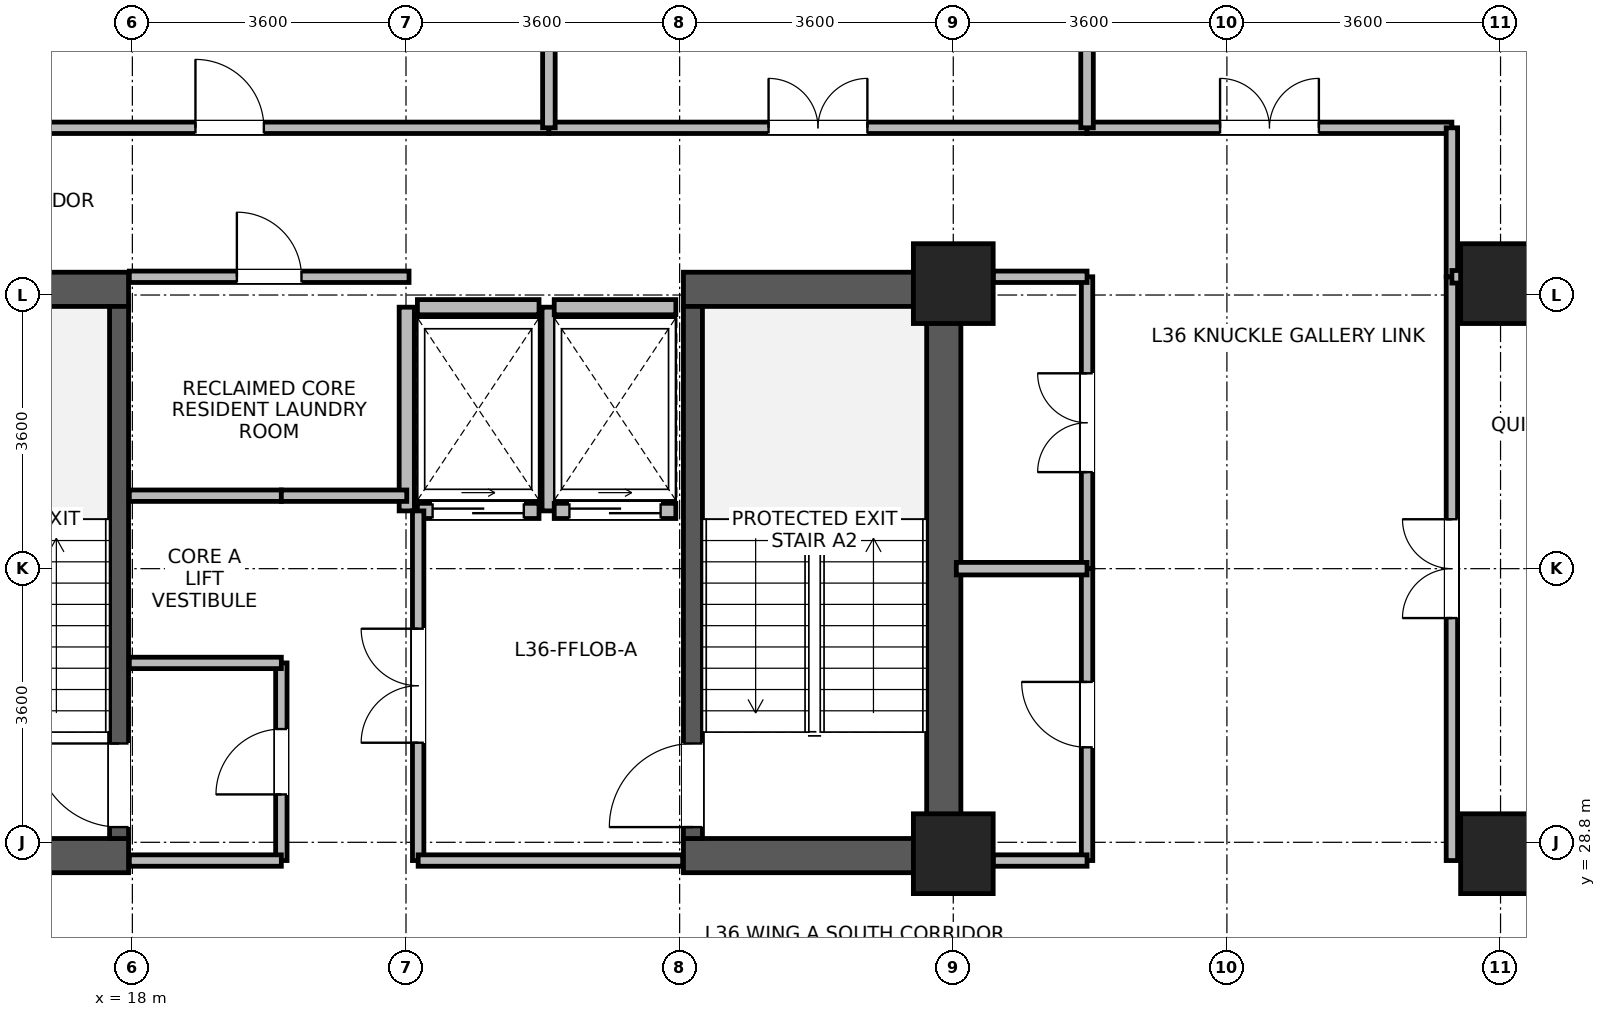
"""IFC4 building model, lengths in metres.
Left out: names, types, materials, properties, quantities, classifications, styles, units other than length and angle.
Written with IfcOpenShell. Run it as: python <this file> out.ifc"""

import sys

from ifc_helpers import new_model, si_unit, direction, frame, frame_2d, origin, origin_2d, place, context, subcontext, project, spatial, rectangle, extrude, source, transform, mapped, element, fill, save


model = new_model("IFC4")
c1 = context("Model", 3, precision=1e-05, world=origin(), true_north=direction((0.0, 1.0)))
c2 = subcontext(c1, "Body", "Model", "MODEL_VIEW")
j1 = project(units=[si_unit("LENGTHUNIT", "METRE"), si_unit("PLANEANGLEUNIT", "RADIAN")], contexts=[c1])
p1 = place(None, origin())
s1 = spatial("IfcSite", under=j1, at=p1, CompositionType="ELEMENT")
p2 = place(p1, origin())
s2 = spatial("IfcBuilding", under=s1, at=p2, CompositionType="ELEMENT")
p3 = place(p2, frame((0.0, 0.0, 143.9)))
s3 = spatial("IfcBuildingStorey", under=s2, at=p3, CompositionType="ELEMENT", Elevation=143.9)
p4 = place(p3, frame((28.675, 28.4, 0.0), z_axis=(0.0, 0.0, 1.0), x_axis=(0.0, 1.0, 0.0)))
e1 = element("IfcWall", 1, at=p4, inside=s3, PredefinedType="SHEAR", context=c2, shape_type="SweptSolid", body=[
    extrude(rectangle(XDim=7.9, YDim=0.45, at=frame_2d((3.95, 0.0))), origin(), (0.0, 0.0, 1.0), 3.46),
])
for number, where, z_axis, x_axis in (
    (2, (14.75, 28.625, 0.0), (0.0, 0.0, 1.0), (1.0, 0.0, 0.0)),
    (3, (25.25, 28.625, 0.0), (0.0, 0.0, 1.0), (1.0, 0.0, 0.0)),
    (4, (14.75, 36.075, 0.0), (0.0, 0.0, 1.0), (1.0, 0.0, 0.0)),
    (5, (25.25, 36.075, 0.0), (0.0, 0.0, 1.0), (1.0, 0.0, 0.0)),
):
    element("IfcWall", number, at=place(p3, frame(where, z_axis=z_axis, x_axis=x_axis)), inside=s3, PredefinedType="SHEAR", context=c2, shape_type="SweptSolid", body=[
        extrude(rectangle(XDim=3.2, YDim=0.45, at=frame_2d((1.6, 0.0))), origin(), (0.0, 0.0, 1.0), 3.46),
    ])
p5 = place(p3, frame((17.825, 28.85, 0.0), z_axis=(0.0, 0.0, 1.0), x_axis=(0.0, 1.0, 0.0)))
e6 = element("IfcWall", 6, at=p5, inside=s3, PredefinedType="SHEAR", context=c2, shape_type="SweptSolid", body=[
    extrude(rectangle(XDim=7.0, YDim=0.25, at=frame_2d((3.5, 0.0))), origin(), (0.0, 0.0, 1.0), 3.46),
])
p6 = place(p5, frame((0.15, 0.0, 0.0)))
e7 = element("IfcOpeningElement", 7, at=p6, cuts=e6, PredefinedType="OPENING", context=c2, shape_type="SweptSolid", body=[
    extrude(rectangle(XDim=1.1, YDim=2.08, at=frame_2d((0.55, 1.04))), frame((0.0, 0.135, 0.0), z_axis=(0.0, -1.0, 0.0), x_axis=(1.0, 0.0, 0.0)), (0.0, 0.0, 1.0), 0.27),
])
p7 = place(p3, frame((25.375, 28.85, 0.0), z_axis=(0.0, 0.0, 1.0), x_axis=(0.0, 1.0, 0.0)))
e8 = element("IfcWall", 8, at=p7, inside=s3, PredefinedType="SHEAR", context=c2, shape_type="SweptSolid", body=[
    extrude(rectangle(XDim=7.0, YDim=0.25, at=frame_2d((3.5, 0.0))), origin(), (0.0, 0.0, 1.0), 3.46),
])
p8 = place(p7, frame((0.15, 0.0, 0.0)))
e9 = element("IfcOpeningElement", 9, at=p8, cuts=e8, PredefinedType="OPENING", context=c2, shape_type="SweptSolid", body=[
    extrude(rectangle(XDim=1.1, YDim=2.08, at=frame_2d((0.55, 1.04))), frame((0.0, 0.135, 0.0), z_axis=(0.0, -1.0, 0.0), x_axis=(1.0, 0.0, 0.0)), (0.0, 0.0, 1.0), 0.27),
])
m1 = source(origin(), c2, "Body", "SweptSolid", [
    extrude(rectangle(XDim=1.05, YDim=1.05, at=origin_2d()), origin(), (0.0, 0.0, 1.0), 3.7),
])
for number, where, z_axis, x_axis in (
    (10, (28.8, 28.65, 0.0), (0.0, 0.0, 1.0), (1.0, 0.0, 0.0)),
    (11, (28.8, 36.15, 0.0), (0.0, 0.0, 1.0), (1.0, 0.0, 0.0)),
    (12, (36.0, 28.65, 0.0), (0.0, 0.0, 1.0), (1.0, 0.0, 0.0)),
    (13, (36.0, 36.15, 0.0), (0.0, 0.0, 1.0), (1.0, 0.0, 0.0)),
):
    element("IfcColumn", number, at=place(p3, frame(where, z_axis=z_axis, x_axis=x_axis)), inside=s3, PredefinedType="COLUMN", context=c2, shape_type="MappedRepresentation", body=[
        mapped(m1, transform((0.0, 0.0, 0.0), x_axis=(1.0, 0.0, 0.0), y_axis=(0.0, 1.0, 0.0), z_axis=(0.0, 0.0, 1.0), scale=1.0)),
    ])
p9 = place(p3, frame((21.75, 33.16, 0.0), z_axis=(0.0, 0.0, 1.0), x_axis=(1.0, 0.0, 0.0)))
e14 = element("IfcWall", 14, at=p9, inside=s3, PredefinedType="PARTITIONING", context=c2, shape_type="SweptSolid", body=[
    extrude(rectangle(XDim=1.6, YDim=0.2, at=frame_2d((0.8, 0.0))), origin(), (0.0, 0.0, 1.0), 3.44),
])
p10 = place(p9, frame((0.2, 0.0, 0.0)))
e15 = element("IfcOpeningElement", 15, at=p10, cuts=e14, PredefinedType="OPENING", context=c2, shape_type="SweptSolid", body=[
    extrude(rectangle(XDim=1.2, YDim=2.12, at=frame_2d((0.6, 1.06))), frame((0.0, 0.11, 0.0), z_axis=(0.0, -1.0, 0.0), x_axis=(1.0, 0.0, 0.0)), (0.0, 0.0, 1.0), 0.22),
])
p11 = place(p3, frame((21.75, 35.84, 0.0), z_axis=(0.0, 0.0, 1.0), x_axis=(1.0, 0.0, 0.0)))
e16 = element("IfcWall", 16, at=p11, inside=s3, PredefinedType="PARTITIONING", context=c2, shape_type="SweptSolid", body=[
    extrude(rectangle(XDim=1.6, YDim=0.2, at=frame_2d((0.8, 0.0))), origin(), (0.0, 0.0, 1.0), 2.44),
])
for number, where, z_axis, x_axis in (
    (17, (21.61, 33.16, 0.0), (0.0, 0.0, 1.0), (0.0, 1.0, 0.0)),
    (18, (23.49, 33.16, 0.0), (0.0, 0.0, 1.0), (0.0, 1.0, 0.0)),
):
    element("IfcWall", number, at=place(p3, frame(where, z_axis=z_axis, x_axis=x_axis)), inside=s3, PredefinedType="PARTITIONING", context=c2, shape_type="SweptSolid", body=[
        extrude(rectangle(XDim=2.68, YDim=0.2, at=frame_2d((1.34, 0.0))), origin(), (0.0, 0.0, 1.0), 3.44),
    ])
p12 = place(p3, frame((23.55, 33.16, 0.0), z_axis=(0.0, 0.0, 1.0), x_axis=(1.0, 0.0, 0.0)))
e19 = element("IfcWall", 19, at=p12, inside=s3, PredefinedType="PARTITIONING", context=c2, shape_type="SweptSolid", body=[
    extrude(rectangle(XDim=1.6, YDim=0.2, at=frame_2d((0.8, 0.0))), origin(), (0.0, 0.0, 1.0), 3.44),
])
p13 = place(p12, frame((0.2, 0.0, 0.0)))
e20 = element("IfcOpeningElement", 20, at=p13, cuts=e19, PredefinedType="OPENING", context=c2, shape_type="SweptSolid", body=[
    extrude(rectangle(XDim=1.2, YDim=2.12, at=frame_2d((0.6, 1.06))), frame((0.0, 0.11, 0.0), z_axis=(0.0, -1.0, 0.0), x_axis=(1.0, 0.0, 0.0)), (0.0, 0.0, 1.0), 0.22),
])
p14 = place(p3, frame((23.55, 35.84, 0.0), z_axis=(0.0, 0.0, 1.0), x_axis=(1.0, 0.0, 0.0)))
e21 = element("IfcWall", 21, at=p14, inside=s3, PredefinedType="PARTITIONING", context=c2, shape_type="SweptSolid", body=[
    extrude(rectangle(XDim=1.6, YDim=0.2, at=frame_2d((0.8, 0.0))), origin(), (0.0, 0.0, 1.0), 2.44),
])
p15 = place(p3, frame((15.08, 38.2, 0.0), z_axis=(0.0, 0.0, 1.0), x_axis=(1.0, 0.0, 0.0)))
e22 = element("IfcWall", 22, at=p15, inside=s3, PredefinedType="PARTITIONING", context=c2, shape_type="SweptSolid", body=[
    extrude(rectangle(XDim=8.4, YDim=0.15, at=frame_2d((4.2, 0.0))), origin(), (0.0, 0.0, 1.0), 3.44),
])
p16 = place(p15, frame((3.75, 0.0, 0.0)))
e23 = element("IfcOpeningElement", 23, at=p16, cuts=e22, PredefinedType="OPENING", context=c2, shape_type="SweptSolid", body=[
    extrude(rectangle(XDim=0.9, YDim=2.08, at=frame_2d((0.45, 1.04))), frame((0.0, 0.085, 0.0), z_axis=(0.0, -1.0, 0.0), x_axis=(1.0, 0.0, 0.0)), (0.0, 0.0, 1.0), 0.17),
])
p17 = place(p3, frame((35.36, 28.56, 0.0), z_axis=(0.0, 0.0, 1.0), x_axis=(0.0, 1.0, 0.0)))
e24 = element("IfcWall", 24, at=p17, inside=s3, PredefinedType="PARTITIONING", context=c2, shape_type="SweptSolid", body=[
    extrude(rectangle(XDim=7.68, YDim=0.15, at=frame_2d((3.84, 0.0))), origin(), (0.0, 0.0, 1.0), 3.44),
])
p18 = place(p17, frame((3.19, 0.0, 0.0)))
e25 = element("IfcOpeningElement", 25, at=p18, cuts=e24, PredefinedType="OPENING", context=c2, shape_type="SweptSolid", body=[
    extrude(rectangle(XDim=1.3, YDim=2.12, at=frame_2d((0.65, 1.06))), frame((0.0, 0.085, 0.0), z_axis=(0.0, -1.0, 0.0), x_axis=(1.0, 0.0, 0.0)), (0.0, 0.0, 1.0), 0.17),
])
p19 = place(p3, frame((23.48, 38.2, 0.0), z_axis=(0.0, 0.0, 1.0), x_axis=(1.0, 0.0, 0.0)))
e26 = element("IfcWall", 26, at=p19, inside=s3, PredefinedType="PARTITIONING", context=c2, shape_type="SweptSolid", body=[
    extrude(rectangle(XDim=7.08, YDim=0.15, at=frame_2d((3.54, 0.0))), origin(), (0.0, 0.0, 1.0), 3.44),
])
p20 = place(p19, frame((2.89, 0.0, 0.0)))
e27 = element("IfcOpeningElement", 27, at=p20, cuts=e26, PredefinedType="OPENING", context=c2, shape_type="SweptSolid", body=[
    extrude(rectangle(XDim=1.3, YDim=2.12, at=frame_2d((0.65, 1.06))), frame((0.0, 0.085, 0.0), z_axis=(0.0, -1.0, 0.0), x_axis=(1.0, 0.0, 0.0)), (0.0, 0.0, 1.0), 0.17),
])
p21 = place(p3, frame((30.56, 38.2, 0.0), z_axis=(0.0, 0.0, 1.0), x_axis=(1.0, 0.0, 0.0)))
e28 = element("IfcWall", 28, at=p21, inside=s3, PredefinedType="PARTITIONING", context=c2, shape_type="SweptSolid", body=[
    extrude(rectangle(XDim=4.8, YDim=0.15, at=frame_2d((2.4, 0.0))), origin(), (0.0, 0.0, 1.0), 3.44),
])
p22 = place(p21, frame((1.75, 0.0, 0.0)))
e29 = element("IfcOpeningElement", 29, at=p22, cuts=e28, PredefinedType="OPENING", context=c2, shape_type="SweptSolid", body=[
    extrude(rectangle(XDim=1.3, YDim=2.12, at=frame_2d((0.65, 1.06))), frame((0.0, 0.085, 0.0), z_axis=(0.0, -1.0, 0.0), x_axis=(1.0, 0.0, 0.0)), (0.0, 0.0, 1.0), 0.17),
])
p23 = place(p3, frame((30.56, 32.4, 0.0), z_axis=(0.0, 0.0, 1.0), x_axis=(0.0, 1.0, 0.0)))
e30 = element("IfcWall", 30, at=p23, inside=s3, PredefinedType="PARTITIONING", context=c2, shape_type="SweptSolid", body=[
    extrude(rectangle(XDim=3.84, YDim=0.15, at=frame_2d((1.92, 0.0))), origin(), (0.0, 0.0, 1.0), 3.44),
])
p24 = place(p23, frame((1.27, 0.0, 0.0)))
e31 = element("IfcOpeningElement", 31, at=p24, cuts=e30, PredefinedType="OPENING", context=c2, shape_type="SweptSolid", body=[
    extrude(rectangle(XDim=1.3, YDim=2.12, at=frame_2d((0.65, 1.06))), frame((0.0, 0.085, 0.0), z_axis=(0.0, -1.0, 0.0), x_axis=(1.0, 0.0, 0.0)), (0.0, 0.0, 1.0), 0.17),
])
p25 = place(p3, frame((30.56, 28.56, 0.0), z_axis=(0.0, 0.0, 1.0), x_axis=(0.0, 1.0, 0.0)))
e32 = element("IfcWall", 32, at=p25, inside=s3, PredefinedType="PARTITIONING", context=c2, shape_type="SweptSolid", body=[
    extrude(rectangle(XDim=3.84, YDim=0.15, at=frame_2d((1.92, 0.0))), origin(), (0.0, 0.0, 1.0), 3.44),
])
p26 = place(p25, frame((1.49, 0.0, 0.0)))
e33 = element("IfcOpeningElement", 33, at=p26, cuts=e32, PredefinedType="OPENING", context=c2, shape_type="SweptSolid", body=[
    extrude(rectangle(XDim=0.86, YDim=2.02, at=frame_2d((0.43, 1.01))), frame((0.0, 0.085, 0.0), z_axis=(0.0, -1.0, 0.0), x_axis=(1.0, 0.0, 0.0)), (0.0, 0.0, 1.0), 0.17),
])
p27 = place(p3, frame((17.96, 36.24, 0.0), z_axis=(0.0, 0.0, 1.0), x_axis=(1.0, 0.0, 0.0)))
e34 = element("IfcWall", 34, at=p27, inside=s3, PredefinedType="PARTITIONING", context=c2, shape_type="SweptSolid", body=[
    extrude(rectangle(XDim=3.68, YDim=0.15, at=frame_2d((1.84, 0.0))), origin(), (0.0, 0.0, 1.0), 2.44),
])
p28 = place(p27, frame((1.415, 0.0, 0.0)))
e35 = element("IfcOpeningElement", 35, at=p28, cuts=e34, PredefinedType="OPENING", context=c2, shape_type="SweptSolid", body=[
    extrude(rectangle(XDim=0.85, YDim=2.04, at=frame_2d((0.425, 1.02))), frame((0.0, 0.085, 0.0), z_axis=(0.0, -1.0, 0.0), x_axis=(1.0, 0.0, 0.0)), (0.0, 0.0, 1.0), 0.17),
])
p29 = place(p3, frame((19.96, 28.56, 0.0), z_axis=(0.0, 0.0, 1.0), x_axis=(0.0, 1.0, 0.0)))
e36 = element("IfcWall", 36, at=p29, inside=s3, PredefinedType="PARTITIONING", context=c2, shape_type="SweptSolid", body=[
    extrude(rectangle(XDim=2.6, YDim=0.15, at=frame_2d((1.3, 0.0))), origin(), (0.0, 0.0, 1.0), 3.44),
])
p30 = place(p29, frame((0.87, 0.0, 0.0)))
e37 = element("IfcOpeningElement", 37, at=p30, cuts=e36, PredefinedType="OPENING", context=c2, shape_type="SweptSolid", body=[
    extrude(rectangle(XDim=0.86, YDim=2.02, at=frame_2d((0.43, 1.01))), frame((0.0, 0.085, 0.0), z_axis=(0.0, -1.0, 0.0), x_axis=(1.0, 0.0, 0.0)), (0.0, 0.0, 1.0), 0.17),
])
p31 = place(p3, frame((17.96, 28.56, 0.0), z_axis=(0.0, 0.0, 1.0), x_axis=(1.0, 0.0, 0.0)))
e38 = element("IfcWall", 38, at=p31, inside=s3, PredefinedType="PARTITIONING", context=c2, shape_type="SweptSolid", body=[
    extrude(rectangle(XDim=2.0, YDim=0.15, at=frame_2d((1.0, 0.0))), origin(), (0.0, 0.0, 1.0), 2.44),
])
for number, where, z_axis, x_axis in (
    (39, (17.96, 31.16, 0.0), (0.0, 0.0, 1.0), (1.0, 0.0, 0.0)),
    (40, (17.96, 33.36, 0.0), (0.0, 0.0, 1.0), (1.0, 0.0, 0.0)),
):
    element("IfcWall", number, at=place(p3, frame(where, z_axis=z_axis, x_axis=x_axis)), inside=s3, PredefinedType="PARTITIONING", context=c2, shape_type="SweptSolid", body=[
        extrude(rectangle(XDim=2.0, YDim=0.15, at=frame_2d((1.0, 0.0))), origin(), (0.0, 0.0, 1.0), 3.44),
    ])
p32 = place(p3, frame((35.36, 36.24, 0.0), z_axis=(0.0, 0.0, 1.0), x_axis=(0.0, 1.0, 0.0)))
e41 = element("IfcWall", 41, at=p32, inside=s3, PredefinedType="PARTITIONING", context=c2, shape_type="SweptSolid", body=[
    extrude(rectangle(XDim=1.96, YDim=0.15, at=frame_2d((0.98, 0.0))), origin(), (0.0, 0.0, 1.0), 3.44),
])
for number, where, z_axis, x_axis in (
    (42, (29.325, 28.56, 0.0), (0.0, 0.0, 1.0), (1.0, 0.0, 0.0)),
    (43, (29.325, 36.24, 0.0), (0.0, 0.0, 1.0), (1.0, 0.0, 0.0)),
):
    element("IfcWall", number, at=place(p3, frame(where, z_axis=z_axis, x_axis=x_axis)), inside=s3, PredefinedType="PARTITIONING", context=c2, shape_type="SweptSolid", body=[
        extrude(rectangle(XDim=1.235, YDim=0.15, at=frame_2d((0.618, 0.0))), origin(), (0.0, 0.0, 1.0), 2.84),
    ])
p33 = place(p3, frame((19.96, 33.36, 0.0), z_axis=(0.0, 0.0, 1.0), x_axis=(1.0, 0.0, 0.0)))
e44 = element("IfcWall", 44, at=p33, inside=s3, PredefinedType="PARTITIONING", context=c2, shape_type="SweptSolid", body=[
    extrude(rectangle(XDim=1.65, YDim=0.15, at=frame_2d((0.825, 0.0))), origin(), (0.0, 0.0, 1.0), 3.44),
])
for number, where, z_axis, x_axis in (
    (45, (23.48, 38.2, 0.0), (0.0, 0.0, 1.0), (0.0, 1.0, 0.0)),
    (46, (30.56, 38.2, 0.0), (0.0, 0.0, 1.0), (0.0, 1.0, 0.0)),
):
    element("IfcWall", number, at=place(p3, frame(where, z_axis=z_axis, x_axis=x_axis)), inside=s3, PredefinedType="PARTITIONING", context=c2, shape_type="SweptSolid", body=[
        extrude(rectangle(XDim=4.868, YDim=0.165, at=frame_2d((2.434, 0.0))), origin(), (0.0, 0.0, 1.0), 3.44),
    ])
p34 = place(p3, frame((21.76, 28.56, 0.0), z_axis=(0.0, 0.0, 1.0), x_axis=(0.0, 1.0, 0.0)))
e47 = element("IfcWall", 47, at=p34, inside=s3, PredefinedType="PARTITIONING", context=c2, shape_type="SweptSolid", body=[
    extrude(rectangle(XDim=4.6, YDim=0.15, at=frame_2d((2.3, 0.0))), origin(), (0.0, 0.0, 1.0), 3.44),
])
p35 = place(p34, frame((1.55, 0.0, 0.0)))
e48 = element("IfcOpeningElement", 48, at=p35, cuts=e47, PredefinedType="OPENING", context=c2, shape_type="SweptSolid", body=[
    extrude(rectangle(XDim=1.5, YDim=2.1, at=frame_2d((0.75, 1.05))), frame((0.0, 0.085, 0.0), z_axis=(0.0, -1.0, 0.0), x_axis=(1.0, 0.0, 0.0)), (0.0, 0.0, 1.0), 0.17),
])
p36 = place(p3, frame((35.36, 36.24, 0.0), z_axis=(0.0, 0.0, 1.0), x_axis=(1.0, 0.0, 0.0)))
e49 = element("IfcWall", 49, at=p36, inside=s3, PredefinedType="PARTITIONING", context=c2, shape_type="SweptSolid", body=[
    extrude(rectangle(XDim=4.38, YDim=0.165, at=frame_2d((2.19, 0.0))), origin(), (0.0, 0.0, 1.0), 2.84),
])
p37 = place(p3, frame((21.76, 28.56, 0.0), z_axis=(0.0, 0.0, 1.0), x_axis=(1.0, 0.0, 0.0)))
e50 = element("IfcWall", 50, at=p37, inside=s3, PredefinedType="PARTITIONING", context=c2, shape_type="SweptSolid", body=[
    extrude(rectangle(XDim=3.48, YDim=0.15, at=frame_2d((1.74, 0.0))), origin(), (0.0, 0.0, 1.0), 2.44),
])
p38 = place(p3, frame((28.84, 32.4, 0.0), z_axis=(0.0, 0.0, 1.0), x_axis=(1.0, 0.0, 0.0)))
e51 = element("IfcWall", 51, at=p38, inside=s3, PredefinedType="PARTITIONING", context=c2, shape_type="SweptSolid", body=[
    extrude(rectangle(XDim=1.72, YDim=0.165, at=frame_2d((0.86, 0.0))), origin(), (0.0, 0.0, 1.0), 3.44),
])
p39 = place(p6, origin())
e52 = element("IfcDoor", 52, at=p39, inside=s3, OperationType="SINGLE_SWING_RIGHT", PredefinedType="DOOR", context=c2, shape_type="SweptSolid", body=[
    extrude(rectangle(XDim=1.1, YDim=2.08, at=frame_2d((0.55, 1.04))), frame((0.0, 0.025, 0.0), z_axis=(0.0, -1.0, 0.0), x_axis=(1.0, 0.0, 0.0)), (0.0, 0.0, 1.0), 0.05),
])
fill(e7, e52)
p40 = place(p8, origin())
e53 = element("IfcDoor", 53, at=p40, inside=s3, OperationType="SINGLE_SWING_LEFT", PredefinedType="DOOR", context=c2, shape_type="SweptSolid", body=[
    extrude(rectangle(XDim=1.1, YDim=2.08, at=frame_2d((0.55, 1.04))), frame((0.0, 0.025, 0.0), z_axis=(0.0, -1.0, 0.0), x_axis=(1.0, 0.0, 0.0)), (0.0, 0.0, 1.0), 0.05),
])
fill(e9, e53)
p41 = place(p10, origin())
e54 = element("IfcDoor", 54, at=p41, inside=s3, OperationType="SLIDING_TO_RIGHT", PredefinedType="DOOR", context=c2, shape_type="SweptSolid", body=[
    extrude(rectangle(XDim=1.2, YDim=2.12, at=frame_2d((0.6, 1.06))), frame((0.0, 0.025, 0.0), z_axis=(0.0, -1.0, 0.0), x_axis=(1.0, 0.0, 0.0)), (0.0, 0.0, 1.0), 0.05),
])
fill(e15, e54)
p42 = place(p13, origin())
e55 = element("IfcDoor", 55, at=p42, inside=s3, OperationType="SLIDING_TO_RIGHT", PredefinedType="DOOR", context=c2, shape_type="SweptSolid", body=[
    extrude(rectangle(XDim=1.2, YDim=2.12, at=frame_2d((0.6, 1.06))), frame((0.0, 0.025, 0.0), z_axis=(0.0, -1.0, 0.0), x_axis=(1.0, 0.0, 0.0)), (0.0, 0.0, 1.0), 0.05),
])
fill(e20, e55)
p43 = place(p16, origin())
e56 = element("IfcDoor", 56, at=p43, inside=s3, OperationType="SINGLE_SWING_LEFT", PredefinedType="DOOR", context=c2, shape_type="SweptSolid", body=[
    extrude(rectangle(XDim=0.9, YDim=2.08, at=frame_2d((0.45, 1.04))), frame((0.0, 0.025, 0.0), z_axis=(0.0, -1.0, 0.0), x_axis=(1.0, 0.0, 0.0)), (0.0, 0.0, 1.0), 0.05),
])
fill(e23, e56)
p44 = place(p18, origin())
e57 = element("IfcDoor", 57, at=p44, inside=s3, OperationType="DOUBLE_DOOR_SINGLE_SWING", PredefinedType="DOOR", context=c2, shape_type="SweptSolid", body=[
    extrude(rectangle(XDim=1.3, YDim=2.12, at=frame_2d((0.65, 1.06))), frame((0.0, 0.025, 0.0), z_axis=(0.0, -1.0, 0.0), x_axis=(1.0, 0.0, 0.0)), (0.0, 0.0, 1.0), 0.05),
])
fill(e25, e57)
p45 = place(p20, origin())
e58 = element("IfcDoor", 58, at=p45, inside=s3, OperationType="DOUBLE_DOOR_SINGLE_SWING", PredefinedType="DOOR", context=c2, shape_type="SweptSolid", body=[
    extrude(rectangle(XDim=1.3, YDim=2.12, at=frame_2d((0.65, 1.06))), frame((0.0, 0.025, 0.0), z_axis=(0.0, -1.0, 0.0), x_axis=(1.0, 0.0, 0.0)), (0.0, 0.0, 1.0), 0.05),
])
fill(e27, e58)
p46 = place(p22, origin())
e59 = element("IfcDoor", 59, at=p46, inside=s3, OperationType="DOUBLE_DOOR_SINGLE_SWING", PredefinedType="DOOR", context=c2, shape_type="SweptSolid", body=[
    extrude(rectangle(XDim=1.3, YDim=2.12, at=frame_2d((0.65, 1.06))), frame((0.0, 0.025, 0.0), z_axis=(0.0, -1.0, 0.0), x_axis=(1.0, 0.0, 0.0)), (0.0, 0.0, 1.0), 0.05),
])
fill(e29, e59)
p47 = place(p24, origin())
e60 = element("IfcDoor", 60, at=p47, inside=s3, OperationType="DOUBLE_DOOR_SINGLE_SWING", PredefinedType="DOOR", context=c2, shape_type="SweptSolid", body=[
    extrude(rectangle(XDim=1.3, YDim=2.12, at=frame_2d((0.65, 1.06))), frame((0.0, 0.025, 0.0), z_axis=(0.0, -1.0, 0.0), x_axis=(1.0, 0.0, 0.0)), (0.0, 0.0, 1.0), 0.05),
])
fill(e31, e60)
p48 = place(p26, origin())
e61 = element("IfcDoor", 61, at=p48, inside=s3, OperationType="SINGLE_SWING_RIGHT", PredefinedType="DOOR", context=c2, shape_type="SweptSolid", body=[
    extrude(rectangle(XDim=0.86, YDim=2.02, at=frame_2d((0.43, 1.01))), frame((0.0, 0.025, 0.0), z_axis=(0.0, -1.0, 0.0), x_axis=(1.0, 0.0, 0.0)), (0.0, 0.0, 1.0), 0.05),
])
fill(e33, e61)
p49 = place(p28, origin())
e62 = element("IfcDoor", 62, at=p49, inside=s3, OperationType="SINGLE_SWING_LEFT", PredefinedType="DOOR", context=c2, shape_type="SweptSolid", body=[
    extrude(rectangle(XDim=0.85, YDim=2.04, at=frame_2d((0.425, 1.02))), frame((0.0, 0.025, 0.0), z_axis=(0.0, -1.0, 0.0), x_axis=(1.0, 0.0, 0.0)), (0.0, 0.0, 1.0), 0.05),
])
fill(e35, e62)
p50 = place(p30, origin())
e63 = element("IfcDoor", 63, at=p50, inside=s3, OperationType="SINGLE_SWING_LEFT", PredefinedType="DOOR", context=c2, shape_type="SweptSolid", body=[
    extrude(rectangle(XDim=0.86, YDim=2.02, at=frame_2d((0.43, 1.01))), frame((0.0, 0.025, 0.0), z_axis=(0.0, -1.0, 0.0), x_axis=(1.0, 0.0, 0.0)), (0.0, 0.0, 1.0), 0.05),
])
fill(e37, e63)
p51 = place(p35, origin())
e64 = element("IfcDoor", 64, at=p51, inside=s3, OperationType="DOUBLE_DOOR_SINGLE_SWING", PredefinedType="DOOR", context=c2, shape_type="SweptSolid", body=[
    extrude(rectangle(XDim=1.5, YDim=2.1, at=frame_2d((0.75, 1.05))), frame((0.0, 0.025, 0.0), z_axis=(0.0, -1.0, 0.0), x_axis=(1.0, 0.0, 0.0)), (0.0, 0.0, 1.0), 0.05),
])
fill(e48, e64)
save(model, sys.argv[1])
